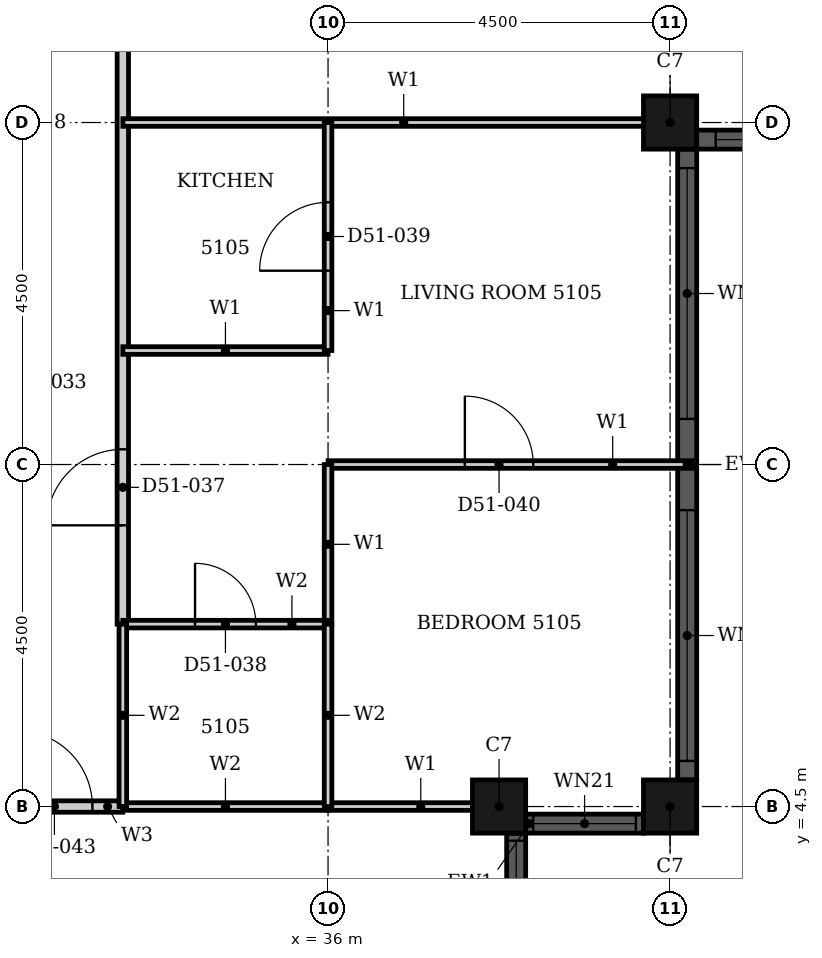
"""IFC4 building model, lengths in metres.
Left out: names, types, materials, properties, quantities, classifications, styles, units other than length and angle.
Written with IfcOpenShell. Run it as: python <this file> out.ifc"""

import sys

from ifc_helpers import new_model, si_unit, direction, frame, frame_2d, origin, origin_2d, place, context, subcontext, project, spatial, rectangle, hollow_rectangle, extrude, element, fill, save


model = new_model("IFC4")
c1 = context("Model", 3, precision=1e-05, world=origin(), true_north=direction((0.0, 1.0)))
c2 = subcontext(c1, "Body", "Model", "MODEL_VIEW")
j1 = project(units=[si_unit("LENGTHUNIT", "METRE"), si_unit("PLANEANGLEUNIT", "RADIAN")], contexts=[c1])
p1 = place(None, origin())
s1 = spatial("IfcSite", under=j1, at=p1, CompositionType="ELEMENT")
p2 = place(p1, origin())
s2 = spatial("IfcBuilding", under=s1, at=p2, CompositionType="ELEMENT")
p3 = place(p2, frame((0.0, 0.0, 203.5)))
s3 = spatial("IfcBuildingStorey", under=s2, at=p3, CompositionType="ELEMENT", Elevation=203.5)
for number, where, z_axis, x_axis in (
    (1, (40.5, 13.5, 0.0), (0.0, 0.0, 1.0), (1.0, 0.0, 0.0)),
    (2, (38.25, 4.5, 0.0), (0.0, 0.0, 1.0), (1.0, 0.0, 0.0)),
    (3, (40.5, 4.5, 0.0), (0.0, 0.0, 1.0), (1.0, 0.0, 0.0)),
):
    element("IfcColumn", number, at=place(p3, frame(where, z_axis=z_axis, x_axis=x_axis)), inside=s3, PredefinedType="COLUMN", context=c2, shape_type="SweptSolid", body=[
        extrude(hollow_rectangle(XDim=0.7, YDim=0.7, WallThickness=0.022, at=origin_2d()), origin(), (0.0, 0.0, 1.0), 3.7),
    ])
p4 = place(p3, frame((40.85, 13.275, 0.0), z_axis=(0.0, 0.0, 1.0), x_axis=(1.0, 0.0, 0.0)))
e4 = element("IfcWall", 4, at=p4, inside=s3, PredefinedType="SOLIDWALL", context=c2, shape_type="SweptSolid", body=[
    extrude(rectangle(XDim=3.8, YDim=0.25, at=frame_2d((1.9, 0.0))), origin(), (0.0, 0.0, 1.0), 3.7),
])
p5 = place(p4, frame((0.25, 0.0, 0.45)))
e5 = element("IfcOpeningElement", 5, at=p5, cuts=e4, PredefinedType="OPENING", context=c2, shape_type="SweptSolid", body=[
    extrude(rectangle(XDim=3.3, YDim=2.3, at=frame_2d((1.65, 1.15))), frame((0.0, 0.135, 0.0), z_axis=(0.0, -1.0, 0.0), x_axis=(1.0, 0.0, 0.0)), (0.0, 0.0, 1.0), 0.27),
])
p6 = place(p3, frame((38.475, 2.6, 0.0), z_axis=(0.0, 0.0, 1.0), x_axis=(0.0, 1.0, 0.0)))
e6 = element("IfcWall", 6, at=p6, inside=s3, PredefinedType="SOLIDWALL", context=c2, shape_type="SweptSolid", body=[
    extrude(rectangle(XDim=1.55, YDim=0.25, at=frame_2d((0.775, 0.0))), origin(), (0.0, 0.0, 1.0), 3.7),
])
p7 = place(p6, frame((0.1, 0.0, 0.9)))
e7 = element("IfcOpeningElement", 7, at=p7, cuts=e6, PredefinedType="OPENING", context=c2, shape_type="SweptSolid", body=[
    extrude(rectangle(XDim=1.35, YDim=1.85, at=frame_2d((0.675, 0.925))), frame((0.0, 0.135, 0.0), z_axis=(0.0, -1.0, 0.0), x_axis=(1.0, 0.0, 0.0)), (0.0, 0.0, 1.0), 0.27),
])
p8 = place(p3, frame((38.6, 4.275, 0.0), z_axis=(0.0, 0.0, 1.0), x_axis=(1.0, 0.0, 0.0)))
e8 = element("IfcWall", 8, at=p8, inside=s3, PredefinedType="SOLIDWALL", context=c2, shape_type="SweptSolid", body=[
    extrude(rectangle(XDim=1.55, YDim=0.25, at=frame_2d((0.775, 0.0))), origin(), (0.0, 0.0, 1.0), 3.7),
])
p9 = place(p8, frame((0.1, 0.0, 0.9)))
e9 = element("IfcOpeningElement", 9, at=p9, cuts=e8, PredefinedType="OPENING", context=c2, shape_type="SweptSolid", body=[
    extrude(rectangle(XDim=1.35, YDim=1.85, at=frame_2d((0.675, 0.925))), frame((0.0, 0.135, 0.0), z_axis=(0.0, -1.0, 0.0), x_axis=(1.0, 0.0, 0.0)), (0.0, 0.0, 1.0), 0.27),
])
p10 = place(p3, frame((40.725, 4.85, 0.0), z_axis=(0.0, 0.0, 1.0), x_axis=(0.0, 1.0, 0.0)))
e10 = element("IfcWall", 10, at=p10, inside=s3, PredefinedType="SOLIDWALL", context=c2, shape_type="SweptSolid", body=[
    extrude(rectangle(XDim=8.3, YDim=0.25, at=frame_2d((4.15, 0.0))), origin(), (0.0, 0.0, 1.0), 3.7),
])
p11 = place(p10, frame((0.25, 0.0, 0.45)))
e11 = element("IfcOpeningElement", 11, at=p11, cuts=e10, PredefinedType="OPENING", context=c2, shape_type="SweptSolid", body=[
    extrude(rectangle(XDim=3.3, YDim=2.3, at=frame_2d((1.65, 1.15))), frame((0.0, 0.135, 0.0), z_axis=(0.0, -1.0, 0.0), x_axis=(1.0, 0.0, 0.0)), (0.0, 0.0, 1.0), 0.27),
])
p12 = place(p10, frame((4.75, 0.0, 0.45)))
e12 = element("IfcOpeningElement", 12, at=p12, cuts=e10, PredefinedType="OPENING", context=c2, shape_type="SweptSolid", body=[
    extrude(rectangle(XDim=3.3, YDim=2.3, at=frame_2d((1.65, 1.15))), frame((0.0, 0.135, 0.0), z_axis=(0.0, -1.0, 0.0), x_axis=(1.0, 0.0, 0.0)), (0.0, 0.0, 1.0), 0.27),
])
p13 = place(p3, frame((31.5, 4.5, 0.0), z_axis=(0.0, 0.0, 1.0), x_axis=(1.0, 0.0, 0.0)))
e13 = element("IfcWall", 13, at=p13, inside=s3, PredefinedType="PARTITIONING", context=c2, shape_type="SweptSolid", body=[
    extrude(rectangle(XDim=1.8, YDim=0.15, at=frame_2d((0.9, 0.0))), origin(), (0.0, 0.0, 1.0), 3.4),
])
p14 = place(p13, frame((0.4, 0.0, 0.0)))
e14 = element("IfcOpeningElement", 14, at=p14, cuts=e13, PredefinedType="OPENING", context=c2, shape_type="SweptSolid", body=[
    extrude(rectangle(XDim=1.0, YDim=2.1, at=frame_2d((0.5, 1.05))), frame((0.0, 0.085, 0.0), z_axis=(0.0, -1.0, 0.0), x_axis=(1.0, 0.0, 0.0)), (0.0, 0.0, 1.0), 0.17),
])
p15 = place(p3, frame((33.3, 6.9, 0.0), z_axis=(0.0, 0.0, 1.0), x_axis=(0.0, 1.0, 0.0)))
e15 = element("IfcWall", 15, at=p15, inside=s3, PredefinedType="PARTITIONING", context=c2, shape_type="SweptSolid", body=[
    extrude(rectangle(XDim=13.799, YDim=0.15, at=frame_2d((6.899, 0.0))), origin(), (0.0, 0.0, 1.0), 3.4),
])
p16 = place(p15, frame((1.3, 0.0, 0.0)))
e16 = element("IfcOpeningElement", 16, at=p16, cuts=e15, PredefinedType="OPENING", context=c2, shape_type="SweptSolid", body=[
    extrude(rectangle(XDim=1.0, YDim=2.2, at=frame_2d((0.5, 1.1))), frame((0.0, 0.085, 0.0), z_axis=(0.0, -1.0, 0.0), x_axis=(1.0, 0.0, 0.0)), (0.0, 0.0, 1.0), 0.17),
])
p17 = place(p3, frame((33.3, 10.5, 0.0), z_axis=(0.0, 0.0, 1.0), x_axis=(1.0, 0.0, 0.0)))
e17 = element("IfcWall", 17, at=p17, inside=s3, PredefinedType="PARTITIONING", context=c2, shape_type="SweptSolid", body=[
    extrude(rectangle(XDim=2.7, YDim=0.1, at=frame_2d((1.35, 0.0))), origin(), (0.0, 0.0, 1.0), 3.4),
])
p18 = place(p3, frame((33.301, 13.5, 0.0), z_axis=(0.0, 0.0, 1.0), x_axis=(1.0, 0.0, 0.0)))
e18 = element("IfcWall", 18, at=p18, inside=s3, PredefinedType="PARTITIONING", context=c2, shape_type="SweptSolid", body=[
    extrude(rectangle(XDim=7.389, YDim=0.1, at=frame_2d((3.694, 0.0))), origin(), (0.0, 0.0, 1.0), 2.48),
])
p19 = place(p3, frame((36.0, 4.5, 0.0), z_axis=(0.0, 0.0, 1.0), x_axis=(1.0, 0.0, 0.0)))
e19 = element("IfcWall", 19, at=p19, inside=s3, PredefinedType="PARTITIONING", context=c2, shape_type="SweptSolid", body=[
    extrude(rectangle(XDim=2.44, YDim=0.1, at=frame_2d((1.22, 0.0))), origin(), (0.0, 0.0, 1.0), 3.4),
])
p20 = place(p3, frame((36.0, 9.0, 0.0), z_axis=(0.0, 0.0, 1.0), x_axis=(1.0, 0.0, 0.0)))
e20 = element("IfcWall", 20, at=p20, inside=s3, PredefinedType="PARTITIONING", context=c2, shape_type="SweptSolid", body=[
    extrude(rectangle(XDim=4.79, YDim=0.1, at=frame_2d((2.395, 0.0))), origin(), (0.0, 0.0, 1.0), 3.4),
])
p21 = place(p20, frame((1.8, 0.0, 0.0)))
e21 = element("IfcOpeningElement", 21, at=p21, cuts=e20, PredefinedType="OPENING", context=c2, shape_type="SweptSolid", body=[
    extrude(rectangle(XDim=0.9, YDim=2.1, at=frame_2d((0.45, 1.05))), frame((0.0, 0.06, 0.0), z_axis=(0.0, -1.0, 0.0), x_axis=(1.0, 0.0, 0.0)), (0.0, 0.0, 1.0), 0.12),
])
p22 = place(p3, frame((36.0, 6.9, 0.0), z_axis=(0.0, 0.0, 1.0), x_axis=(0.0, 1.0, 0.0)))
e22 = element("IfcWall", 22, at=p22, inside=s3, PredefinedType="PARTITIONING", context=c2, shape_type="SweptSolid", body=[
    extrude(rectangle(XDim=2.1, YDim=0.1, at=frame_2d((1.05, 0.0))), origin(), (0.0, 0.0, 1.0), 2.68),
])
p23 = place(p3, frame((36.0, 10.5, 0.0), z_axis=(0.0, 0.0, 1.0), x_axis=(0.0, 1.0, 0.0)))
e23 = element("IfcWall", 23, at=p23, inside=s3, PredefinedType="PARTITIONING", context=c2, shape_type="SweptSolid", body=[
    extrude(rectangle(XDim=3.0, YDim=0.1, at=frame_2d((1.5, 0.0))), origin(), (0.0, 0.0, 1.0), 2.68),
])
p24 = place(p23, frame((1.05, 0.0, 0.0)))
e24 = element("IfcOpeningElement", 24, at=p24, cuts=e23, PredefinedType="OPENING", context=c2, shape_type="SweptSolid", body=[
    extrude(rectangle(XDim=0.9, YDim=2.1, at=frame_2d((0.45, 1.05))), frame((0.0, 0.06, 0.0), z_axis=(0.0, -1.0, 0.0), x_axis=(1.0, 0.0, 0.0)), (0.0, 0.0, 1.0), 0.12),
])
p25 = place(p3, frame((33.3, 4.5, 0.0), z_axis=(0.0, 0.0, 1.0), x_axis=(1.0, 0.0, 0.0)))
e25 = element("IfcWall", 25, at=p25, inside=s3, PredefinedType="PARTITIONING", context=c2, shape_type="SweptSolid", body=[
    extrude(rectangle(XDim=2.7, YDim=0.1, at=frame_2d((1.35, 0.0))), origin(), (0.0, 0.0, 1.0), 3.4),
])
p26 = place(p3, frame((33.3, 6.9, 0.0), z_axis=(0.0, 0.0, 1.0), x_axis=(1.0, 0.0, 0.0)))
e26 = element("IfcWall", 26, at=p26, inside=s3, PredefinedType="PARTITIONING", context=c2, shape_type="SweptSolid", body=[
    extrude(rectangle(XDim=2.7, YDim=0.1, at=frame_2d((1.35, 0.0))), origin(), (0.0, 0.0, 1.0), 3.4),
])
p27 = place(p26, frame((0.95, 0.0, 0.0)))
e27 = element("IfcOpeningElement", 27, at=p27, cuts=e26, PredefinedType="OPENING", context=c2, shape_type="SweptSolid", body=[
    extrude(rectangle(XDim=0.8, YDim=2.1, at=frame_2d((0.4, 1.05))), frame((0.0, 0.06, 0.0), z_axis=(0.0, -1.0, 0.0), x_axis=(1.0, 0.0, 0.0)), (0.0, 0.0, 1.0), 0.12),
])
p28 = place(p3, frame((33.3, 4.5, 0.0), z_axis=(0.0, 0.0, 1.0), x_axis=(0.0, 1.0, 0.0)))
e28 = element("IfcWall", 28, at=p28, inside=s3, PredefinedType="PARTITIONING", context=c2, shape_type="SweptSolid", body=[
    extrude(rectangle(XDim=2.4, YDim=0.1, at=frame_2d((1.2, 0.0))), origin(), (0.0, 0.0, 1.0), 3.4),
])
p29 = place(p3, frame((36.0, 4.5, 0.0), z_axis=(0.0, 0.0, 1.0), x_axis=(0.0, 1.0, 0.0)))
e29 = element("IfcWall", 29, at=p29, inside=s3, PredefinedType="PARTITIONING", context=c2, shape_type="SweptSolid", body=[
    extrude(rectangle(XDim=2.4, YDim=0.1, at=frame_2d((1.2, 0.0))), origin(), (0.0, 0.0, 1.0), 2.68),
])
p30 = place(p5, origin())
e30 = element("IfcWindow", 30, at=p30, inside=s3, PartitioningType="SINGLE_PANEL", PredefinedType="WINDOW", context=c2, shape_type="SweptSolid", body=[
    extrude(rectangle(XDim=3.3, YDim=2.3, at=frame_2d((1.65, 1.15))), frame((0.0, 0.03, 0.0), z_axis=(0.0, -1.0, 0.0), x_axis=(1.0, 0.0, 0.0)), (0.0, 0.0, 1.0), 0.06),
])
fill(e5, e30)
p31 = place(p7, origin())
e31 = element("IfcWindow", 31, at=p31, inside=s3, PartitioningType="SINGLE_PANEL", PredefinedType="WINDOW", context=c2, shape_type="SweptSolid", body=[
    extrude(rectangle(XDim=1.35, YDim=1.85, at=frame_2d((0.675, 0.925))), frame((0.0, 0.03, 0.0), z_axis=(0.0, -1.0, 0.0), x_axis=(1.0, 0.0, 0.0)), (0.0, 0.0, 1.0), 0.06),
])
fill(e7, e31)
p32 = place(p9, origin())
e32 = element("IfcWindow", 32, at=p32, inside=s3, PartitioningType="SINGLE_PANEL", PredefinedType="WINDOW", context=c2, shape_type="SweptSolid", body=[
    extrude(rectangle(XDim=1.35, YDim=1.85, at=frame_2d((0.675, 0.925))), frame((0.0, 0.03, 0.0), z_axis=(0.0, -1.0, 0.0), x_axis=(1.0, 0.0, 0.0)), (0.0, 0.0, 1.0), 0.06),
])
fill(e9, e32)
p33 = place(p11, origin())
e33 = element("IfcWindow", 33, at=p33, inside=s3, PartitioningType="SINGLE_PANEL", PredefinedType="WINDOW", context=c2, shape_type="SweptSolid", body=[
    extrude(rectangle(XDim=3.3, YDim=2.3, at=frame_2d((1.65, 1.15))), frame((0.0, 0.03, 0.0), z_axis=(0.0, -1.0, 0.0), x_axis=(1.0, 0.0, 0.0)), (0.0, 0.0, 1.0), 0.06),
])
fill(e11, e33)
p34 = place(p12, origin())
e34 = element("IfcWindow", 34, at=p34, inside=s3, PartitioningType="SINGLE_PANEL", PredefinedType="WINDOW", context=c2, shape_type="SweptSolid", body=[
    extrude(rectangle(XDim=3.3, YDim=2.3, at=frame_2d((1.65, 1.15))), frame((0.0, 0.03, 0.0), z_axis=(0.0, -1.0, 0.0), x_axis=(1.0, 0.0, 0.0)), (0.0, 0.0, 1.0), 0.06),
])
fill(e12, e34)
p35 = place(p16, origin())
e35 = element("IfcDoor", 35, at=p35, inside=s3, OperationType="SINGLE_SWING_RIGHT", PredefinedType="DOOR", context=c2, shape_type="SweptSolid", body=[
    extrude(rectangle(XDim=1.0, YDim=2.2, at=frame_2d((0.5, 1.1))), frame((0.0, 0.025, 0.0), z_axis=(0.0, -1.0, 0.0), x_axis=(1.0, 0.0, 0.0)), (0.0, 0.0, 1.0), 0.05),
])
fill(e16, e35)
p36 = place(p27, origin())
e36 = element("IfcDoor", 36, at=p36, inside=s3, OperationType="SINGLE_SWING_RIGHT", PredefinedType="DOOR", context=c2, shape_type="SweptSolid", body=[
    extrude(rectangle(XDim=0.8, YDim=2.1, at=frame_2d((0.4, 1.05))), frame((0.0, 0.025, 0.0), z_axis=(0.0, -1.0, 0.0), x_axis=(1.0, 0.0, 0.0)), (0.0, 0.0, 1.0), 0.05),
])
fill(e27, e36)
p37 = place(p24, origin())
e37 = element("IfcDoor", 37, at=p37, inside=s3, OperationType="SINGLE_SWING_LEFT", PredefinedType="DOOR", context=c2, shape_type="SweptSolid", body=[
    extrude(rectangle(XDim=0.9, YDim=2.1, at=frame_2d((0.45, 1.05))), frame((0.0, 0.025, 0.0), z_axis=(0.0, -1.0, 0.0), x_axis=(1.0, 0.0, 0.0)), (0.0, 0.0, 1.0), 0.05),
])
fill(e24, e37)
p38 = place(p21, origin())
e38 = element("IfcDoor", 38, at=p38, inside=s3, OperationType="SINGLE_SWING_RIGHT", PredefinedType="DOOR", context=c2, shape_type="SweptSolid", body=[
    extrude(rectangle(XDim=0.9, YDim=2.1, at=frame_2d((0.45, 1.05))), frame((0.0, 0.025, 0.0), z_axis=(0.0, -1.0, 0.0), x_axis=(1.0, 0.0, 0.0)), (0.0, 0.0, 1.0), 0.05),
])
fill(e21, e38)
p39 = place(p14, origin())
e39 = element("IfcDoor", 39, at=p39, inside=s3, OperationType="SINGLE_SWING_LEFT", PredefinedType="DOOR", context=c2, shape_type="SweptSolid", body=[
    extrude(rectangle(XDim=1.0, YDim=2.1, at=frame_2d((0.5, 1.05))), frame((0.0, 0.025, 0.0), z_axis=(0.0, -1.0, 0.0), x_axis=(1.0, 0.0, 0.0)), (0.0, 0.0, 1.0), 0.05),
])
fill(e14, e39)
save(model, sys.argv[1])
